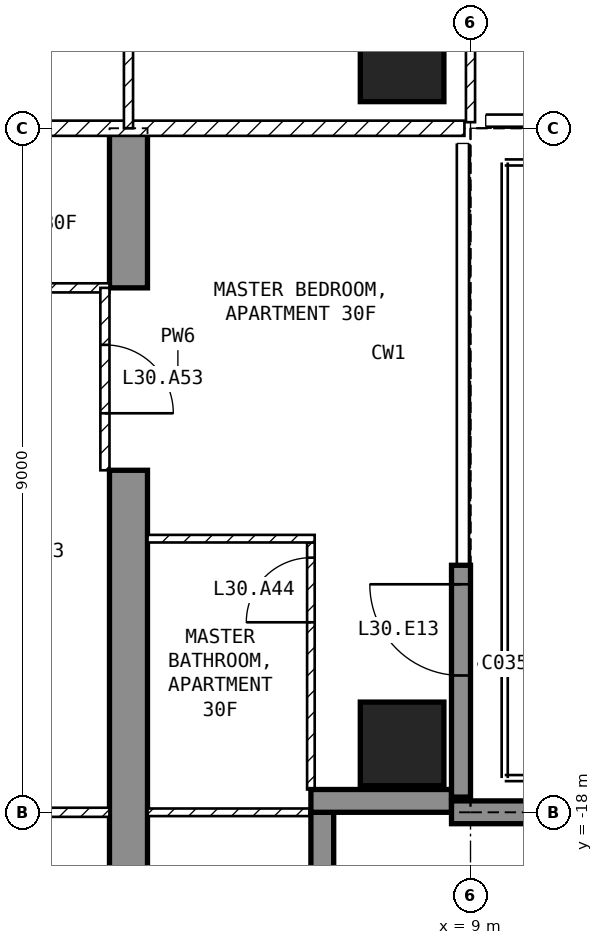
"""IFC4 building model, lengths in metres.
Left out: names, types, materials, properties, quantities, classifications, styles, units other than length and angle.
Written with IfcOpenShell. Run it as: python <this file> out.ifc"""

import sys

from ifc_helpers import new_model, si_unit, direction, frame, frame_2d, origin, origin_2d, place, context, subcontext, project, spatial, polyline, rectangle, outline, extrude, element, fill, save


model = new_model("IFC4")
c1 = context("Model", 3, precision=1e-05, world=origin(), true_north=direction((0.0, 1.0)))
c2 = subcontext(c1, "Body", "Model", "MODEL_VIEW")
j1 = project(units=[si_unit("LENGTHUNIT", "METRE"), si_unit("PLANEANGLEUNIT", "RADIAN")], contexts=[c1])
p1 = place(None, origin())
s1 = spatial("IfcSite", under=j1, at=p1, CompositionType="ELEMENT")
p2 = place(p1, origin())
s2 = spatial("IfcBuilding", under=s1, at=p2, CompositionType="ELEMENT")
p3 = place(p2, frame((0.0, 0.0, 126.9)))
s3 = spatial("IfcBuildingStorey", under=s2, at=p3, CompositionType="ELEMENT", Elevation=126.9)
for number, where, z_axis, x_axis in (
    (1, (8.1, -17.1, -0.25), (0.0, 0.0, 1.0), (1.0, 0.0, 0.0)),
    (2, (8.1, -8.1, -0.25), (0.0, 0.0, 1.0), (1.0, 0.0, 0.0)),
):
    element("IfcColumn", number, at=place(p3, frame(where, z_axis=z_axis, x_axis=x_axis)), inside=s3, PredefinedType="COLUMN", context=c2, shape_type="SweptSolid", body=[
        extrude(rectangle(XDim=1.1, YDim=1.1, at=origin_2d()), origin(), (0.0, 0.0, 1.0), 3.5),
    ])
p4 = place(p3, frame((4.25, -20.15, -0.25), z_axis=(1.0, 0.0, 0.0), x_axis=(0.0, 1.0, 0.0)))
e3 = element("IfcWall", 3, at=p4, inside=s3, PredefinedType="SHEAR", context=c2, shape_type="SweptSolid", body=[
    extrude(outline(polyline([(0.0, 0.0), (6.65, 0.0), (6.65, 2.65), (9.05, 2.65), (9.05, 0.0), (11.15, 0.0), (11.15, 3.5), (0.0, 3.5), (0.0, 0.0)])), origin(), (0.0, 0.0, 1.0), 0.5),
])
p5 = place(p3, frame((8.875, -17.8, 0.0), z_axis=(0.0, 0.0, 1.0), x_axis=(0.0, 1.0, 0.0)))
e4 = element("IfcWall", 4, at=p5, inside=s3, PredefinedType="SOLIDWALL", context=c2, shape_type="SweptSolid", body=[
    extrude(rectangle(XDim=3.05, YDim=0.25, at=frame_2d((1.525, 0.0))), origin(), (0.0, 0.0, 1.0), 3.25),
])
p6 = place(p5, frame((1.6, 0.0, 0.0)))
e5 = element("IfcOpeningElement", 5, at=p6, cuts=e4, PredefinedType="OPENING", context=c2, shape_type="SweptSolid", body=[
    extrude(rectangle(XDim=1.2, YDim=2.4, at=frame_2d((0.6, 1.2))), frame((0.0, 0.135, 0.0), z_axis=(0.0, -1.0, 0.0), x_axis=(1.0, 0.0, 0.0)), (0.0, 0.0, 1.0), 0.27),
])
p7 = place(p3, frame((7.05, -19.8, 0.0), z_axis=(0.0, 0.0, 1.0), x_axis=(0.0, 1.0, 0.0)))
e6 = element("IfcWall", 6, at=p7, inside=s3, PredefinedType="SOLIDWALL", context=c2, shape_type="SweptSolid", body=[
    extrude(rectangle(XDim=1.8, YDim=0.3, at=frame_2d((0.9, 0.0))), origin(), (0.0, 0.0, 1.0), 3.25),
])
p8 = place(p3, frame((6.9, -17.85, 0.0), z_axis=(0.0, 0.0, 1.0), x_axis=(1.0, 0.0, 0.0)))
e7 = element("IfcWall", 7, at=p8, inside=s3, PredefinedType="SOLIDWALL", context=c2, shape_type="SweptSolid", body=[
    extrude(rectangle(XDim=1.85, YDim=0.3, at=frame_2d((0.925, 0.0))), origin(), (0.0, 0.0, 1.0), 3.25),
])
p9 = place(p3, frame((8.75, -18.0, 0.0), z_axis=(0.0, 0.0, 1.0), x_axis=(1.0, 0.0, 0.0)))
e8 = element("IfcWall", 8, at=p9, inside=s3, PredefinedType="SOLIDWALL", context=c2, shape_type="SweptSolid", body=[
    extrude(rectangle(XDim=2.99, YDim=0.3, at=frame_2d((1.495, 0.0))), origin(), (0.0, 0.0, 1.0), 3.25),
])
p10 = place(p3, frame((8.92, -9.0, 0.0), z_axis=(0.0, 0.0, 1.0), x_axis=(-1.0, 0.0, 0.0)))
e9 = element("IfcWall", 9, at=p10, inside=s3, PredefinedType="PARTITIONING", context=c2, shape_type="SweptSolid", body=[
    extrude(rectangle(XDim=17.84, YDim=0.2, at=frame_2d((8.92, 0.0))), origin(), (0.0, 0.0, 1.0), 3.25),
])
p11 = place(p10, frame((8.42, 0.0, 0.0)))
e10 = element("IfcOpeningElement", 10, at=p11, cuts=e9, PredefinedType="OPENING", context=c2, shape_type="SweptSolid", body=[
    extrude(rectangle(XDim=1.0, YDim=2.1, at=frame_2d((0.5, 1.05))), frame((0.0, 0.11, 0.0), z_axis=(0.0, -1.0, 0.0), x_axis=(1.0, 0.0, 0.0)), (0.0, 0.0, 1.0), 0.22),
])
p12 = place(p3, frame((9.0, -8.92, 0.0), z_axis=(0.0, 0.0, 1.0), x_axis=(0.0, 1.0, 0.0)))
e11 = element("IfcWall", 11, at=p12, inside=s3, PredefinedType="PARTITIONING", context=c2, shape_type="SweptSolid", body=[
    extrude(rectangle(XDim=7.62, YDim=0.12, at=frame_2d((3.81, 0.0))), origin(), (0.0, 0.0, 1.0), 3.25),
])
p13 = place(p12, frame((6.32, 0.0, 0.0)))
e12 = element("IfcOpeningElement", 12, at=p13, cuts=e11, PredefinedType="OPENING", context=c2, shape_type="SweptSolid", body=[
    extrude(rectangle(XDim=0.9, YDim=2.1, at=frame_2d((0.45, 1.05))), frame((0.0, 0.07, 0.0), z_axis=(0.0, -1.0, 0.0), x_axis=(1.0, 0.0, 0.0)), (0.0, 0.0, 1.0), 0.14),
])
p14 = place(p3, frame((4.5, -9.0, 0.0), z_axis=(0.0, 0.0, 1.0), x_axis=(0.0, 1.0, 0.0)))
e13 = element("IfcWall", 13, at=p14, inside=s3, PredefinedType="PARTITIONING", context=c2, shape_type="SweptSolid", body=[
    extrude(rectangle(XDim=4.5, YDim=0.12, at=frame_2d((2.25, 0.0))), origin(), (0.0, 0.0, 1.0), 3.25),
])
p15 = place(p14, frame((1.8, 0.0, 0.0)))
e14 = element("IfcOpeningElement", 14, at=p15, cuts=e13, PredefinedType="OPENING", context=c2, shape_type="SweptSolid", body=[
    extrude(rectangle(XDim=0.9, YDim=2.1, at=frame_2d((0.45, 1.05))), frame((0.0, 0.07, 0.0), z_axis=(0.0, -1.0, 0.0), x_axis=(1.0, 0.0, 0.0)), (0.0, 0.0, 1.0), 0.14),
])
p16 = place(p3, frame((4.25, -11.1, 0.0), z_axis=(0.0, 0.0, 1.0), x_axis=(-1.0, 0.0, 0.0)))
e15 = element("IfcWall", 15, at=p16, inside=s3, PredefinedType="PARTITIONING", context=c2, shape_type="SweptSolid", body=[
    extrude(rectangle(XDim=6.35, YDim=0.12, at=frame_2d((3.175, 0.0))), origin(), (0.0, 0.0, 1.0), 3.25),
])
p17 = place(p16, frame((2.725, 0.0, 0.0)))
e16 = element("IfcOpeningElement", 16, at=p17, cuts=e15, PredefinedType="OPENING", context=c2, shape_type="SweptSolid", body=[
    extrude(rectangle(XDim=0.9, YDim=2.1, at=frame_2d((0.45, 1.05))), frame((0.0, 0.07, 0.0), z_axis=(0.0, -1.0, 0.0), x_axis=(1.0, 0.0, 0.0)), (0.0, 0.0, 1.0), 0.14),
])
p18 = place(p3, frame((4.25, -18.0, 0.0), z_axis=(0.0, 0.0, 1.0), x_axis=(-1.0, 0.0, 0.0)))
e17 = element("IfcWall", 17, at=p18, inside=s3, PredefinedType="PARTITIONING", context=c2, shape_type="SweptSolid", body=[
    extrude(rectangle(XDim=8.5, YDim=0.12, at=frame_2d((4.25, 0.0))), origin(), (0.0, 0.0, 1.0), 3.25),
])
p19 = place(p18, frame((1.925, 0.0, 0.0)))
e18 = element("IfcOpeningElement", 18, at=p19, cuts=e17, PredefinedType="OPENING", context=c2, shape_type="SweptSolid", body=[
    extrude(rectangle(XDim=0.9, YDim=2.1, at=frame_2d((0.45, 1.05))), frame((0.0, 0.07, 0.0), z_axis=(0.0, -1.0, 0.0), x_axis=(1.0, 0.0, 0.0)), (0.0, 0.0, 1.0), 0.14),
])
p20 = place(p3, frame((6.9, -17.7, 0.0), z_axis=(0.0, 0.0, 1.0), x_axis=(0.0, 1.0, 0.0)))
e19 = element("IfcWall", 19, at=p20, inside=s3, PredefinedType="PARTITIONING", context=c2, shape_type="SweptSolid", body=[
    extrude(rectangle(XDim=3.25, YDim=0.1, at=frame_2d((1.625, 0.0))), origin(), (0.0, 0.0, 1.0), 3.25),
])
p21 = place(p20, frame((2.2, 0.0, 0.0)))
e20 = element("IfcOpeningElement", 20, at=p21, cuts=e19, PredefinedType="OPENING", context=c2, shape_type="SweptSolid", body=[
    extrude(rectangle(XDim=0.85, YDim=2.1, at=frame_2d((0.425, 1.05))), frame((0.0, 0.06, 0.0), z_axis=(0.0, -1.0, 0.0), x_axis=(1.0, 0.0, 0.0)), (0.0, 0.0, 1.0), 0.12),
])
p22 = place(p3, frame((6.95, -14.4, 0.0), z_axis=(0.0, 0.0, 1.0), x_axis=(-1.0, 0.0, 0.0)))
e21 = element("IfcWall", 21, at=p22, inside=s3, PredefinedType="PARTITIONING", context=c2, shape_type="SweptSolid", body=[
    extrude(rectangle(XDim=2.2, YDim=0.1, at=frame_2d((1.1, 0.0))), origin(), (0.0, 0.0, 1.0), 3.25),
])
p23 = place(p3, frame((7.12, -18.0, 0.0), z_axis=(0.0, 0.0, 1.0), x_axis=(-1.0, 0.0, 0.0)))
e22 = element("IfcWall", 22, at=p23, inside=s3, PredefinedType="PARTITIONING", context=c2, shape_type="SweptSolid", body=[
    extrude(rectangle(XDim=2.37, YDim=0.1, at=frame_2d((1.185, 0.0))), origin(), (0.0, 0.0, 1.0), 3.25),
])
p24 = place(p3, frame((4.19, -11.1, 0.0), z_axis=(0.0, 0.0, 1.0), x_axis=(0.0, -1.0, 0.0)))
e23 = element("IfcWall", 23, at=p24, inside=s3, PredefinedType="PARTITIONING", context=c2, shape_type="SweptSolid", body=[
    extrude(rectangle(XDim=2.4, YDim=0.12, at=frame_2d((1.2, 0.0))), origin(), (0.0, 0.0, 1.0), 2.4),
])
p25 = place(p24, frame((0.75, 0.0, 0.0)))
e24 = element("IfcOpeningElement", 24, at=p25, cuts=e23, PredefinedType="OPENING", context=c2, shape_type="SweptSolid", body=[
    extrude(rectangle(XDim=0.9, YDim=2.1, at=frame_2d((0.45, 1.05))), frame((0.0, 0.07, 0.0), z_axis=(0.0, -1.0, 0.0), x_axis=(1.0, 0.0, 0.0)), (0.0, 0.0, 1.0), 0.14),
])
p26 = place(p6, origin())
e25 = element("IfcDoor", 25, at=p26, inside=s3, OperationType="SINGLE_SWING_RIGHT", PredefinedType="DOOR", context=c2, shape_type="SweptSolid", body=[
    extrude(rectangle(XDim=1.2, YDim=2.4, at=frame_2d((0.6, 1.2))), frame((0.0, 0.025, 0.0), z_axis=(0.0, -1.0, 0.0), x_axis=(1.0, 0.0, 0.0)), (0.0, 0.0, 1.0), 0.05),
])
fill(e5, e25)
p27 = place(p21, origin())
e26 = element("IfcDoor", 26, at=p27, inside=s3, OperationType="SINGLE_SWING_LEFT", PredefinedType="DOOR", context=c2, shape_type="SweptSolid", body=[
    extrude(rectangle(XDim=0.85, YDim=2.1, at=frame_2d((0.425, 1.05))), frame((0.0, 0.025, 0.0), z_axis=(0.0, -1.0, 0.0), x_axis=(1.0, 0.0, 0.0)), (0.0, 0.0, 1.0), 0.05),
])
fill(e20, e26)
p28 = place(p25, origin())
e27 = element("IfcDoor", 27, at=p28, inside=s3, OperationType="SINGLE_SWING_RIGHT", PredefinedType="DOOR", context=c2, shape_type="SweptSolid", body=[
    extrude(rectangle(XDim=0.9, YDim=2.1, at=frame_2d((0.45, 1.05))), frame((0.0, 0.025, 0.0), z_axis=(0.0, -1.0, 0.0), x_axis=(1.0, 0.0, 0.0)), (0.0, 0.0, 1.0), 0.05),
])
fill(e24, e27)
save(model, sys.argv[1])
